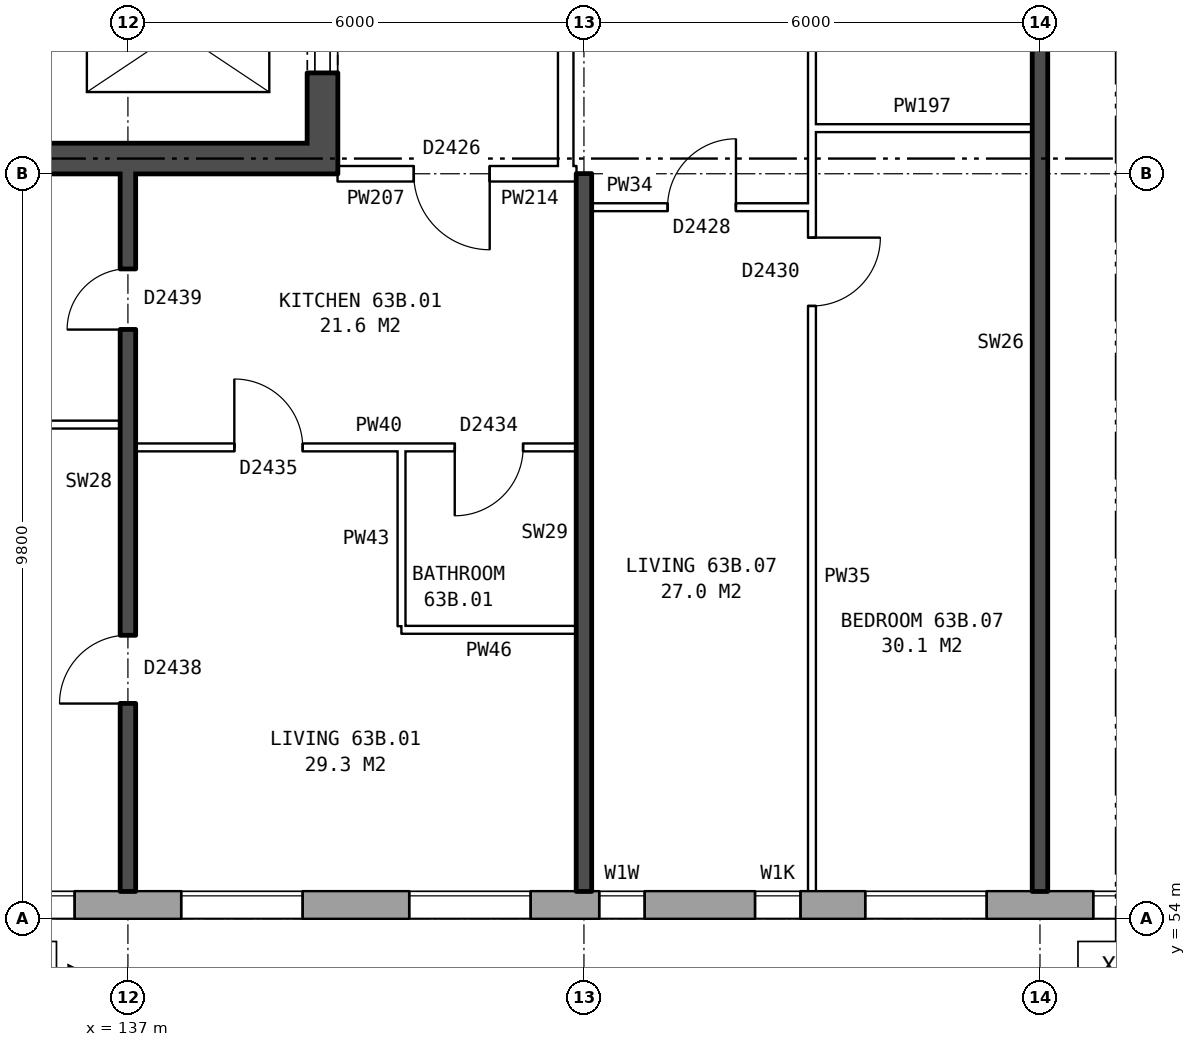
"""IFC4 building model, lengths in metres.
Left out: names, types, materials, properties, quantities, classifications, styles, units other than length and angle.
Written with IfcOpenShell. Run it as: python <this file> out.ifc"""

import sys

from ifc_helpers import new_model, si_unit, direction, frame, frame_2d, origin, place, context, subcontext, project, spatial, rectangle, extrude, element, fill, save


model = new_model("IFC4")
c1 = context("Model", 3, precision=1e-05, world=origin(), true_north=direction((0.0, 1.0)))
c2 = subcontext(c1, "Body", "Model", "MODEL_VIEW")
j1 = project(units=[si_unit("LENGTHUNIT", "METRE"), si_unit("PLANEANGLEUNIT", "RADIAN")], contexts=[c1])
p1 = place(None, origin())
s1 = spatial("IfcSite", under=j1, at=p1, CompositionType="ELEMENT")
p2 = place(p1, origin())
s2 = spatial("IfcBuilding", under=s1, at=p2, CompositionType="ELEMENT")
p3 = place(p2, frame((0.0, 0.0, 224.5)))
s3 = spatial("IfcBuildingStorey", under=s2, at=p3, CompositionType="ELEMENT", Elevation=224.5)
p4 = place(p3, frame((132.05, 54.18, 0.0), z_axis=(0.0, 0.0, 1.0), x_axis=(1.0, 0.0, 0.0)))
e1 = element("IfcWall", 1, at=p4, inside=s3, PredefinedType="STANDARD", context=c2, shape_type="SweptSolid", body=[
    extrude(rectangle(XDim=33.875, YDim=0.36, at=frame_2d((16.938, 0.0))), origin(), (0.0, 0.0, 1.0), 2.85),
])
p5 = place(p4, frame((2.65, 0.0, 0.8)))
e2 = element("IfcOpeningElement", 2, at=p5, cuts=e1, PredefinedType="OPENING", context=c2, shape_type="SweptSolid", body=[
    extrude(rectangle(XDim=1.6, YDim=1.8, at=frame_2d((0.8, 0.9))), frame((0.0, 0.19, 0.0), z_axis=(0.0, -1.0, 0.0), x_axis=(1.0, 0.0, 0.0)), (0.0, 0.0, 1.0), 0.38),
])
p6 = place(p4, frame((5.65, 0.0, 0.8)))
e3 = element("IfcOpeningElement", 3, at=p6, cuts=e1, PredefinedType="OPENING", context=c2, shape_type="SweptSolid", body=[
    extrude(rectangle(XDim=1.6, YDim=1.8, at=frame_2d((0.8, 0.9))), frame((0.0, 0.19, 0.0), z_axis=(0.0, -1.0, 0.0), x_axis=(1.0, 0.0, 0.0)), (0.0, 0.0, 1.0), 0.38),
])
p7 = place(p4, frame((8.65, 0.0, 0.8)))
e4 = element("IfcOpeningElement", 4, at=p7, cuts=e1, PredefinedType="OPENING", context=c2, shape_type="SweptSolid", body=[
    extrude(rectangle(XDim=1.6, YDim=1.8, at=frame_2d((0.8, 0.9))), frame((0.0, 0.19, 0.0), z_axis=(0.0, -1.0, 0.0), x_axis=(1.0, 0.0, 0.0)), (0.0, 0.0, 1.0), 0.38),
])
p8 = place(p4, frame((11.15, 0.0, 1.7)))
e5 = element("IfcOpeningElement", 5, at=p8, cuts=e1, PredefinedType="OPENING", context=c2, shape_type="SweptSolid", body=[
    extrude(rectangle(XDim=0.6, YDim=0.9, at=frame_2d((0.3, 0.45))), frame((0.0, 0.19, 0.0), z_axis=(0.0, -1.0, 0.0), x_axis=(1.0, 0.0, 0.0)), (0.0, 0.0, 1.0), 0.38),
])
p9 = place(p4, frame((14.65, 0.0, 0.8)))
e6 = element("IfcOpeningElement", 6, at=p9, cuts=e1, PredefinedType="OPENING", context=c2, shape_type="SweptSolid", body=[
    extrude(rectangle(XDim=1.6, YDim=1.8, at=frame_2d((0.8, 0.9))), frame((0.0, 0.19, 0.0), z_axis=(0.0, -1.0, 0.0), x_axis=(1.0, 0.0, 0.0)), (0.0, 0.0, 1.0), 0.38),
])
p10 = place(p4, frame((17.65, 0.0, 0.8)))
e7 = element("IfcOpeningElement", 7, at=p10, cuts=e1, PredefinedType="OPENING", context=c2, shape_type="SweptSolid", body=[
    extrude(rectangle(XDim=1.6, YDim=1.8, at=frame_2d((0.8, 0.9))), frame((0.0, 0.19, 0.0), z_axis=(0.0, -1.0, 0.0), x_axis=(1.0, 0.0, 0.0)), (0.0, 0.0, 1.0), 0.38),
])
p11 = place(p4, frame((20.65, 0.0, 0.8)))
e8 = element("IfcOpeningElement", 8, at=p11, cuts=e1, PredefinedType="OPENING", context=c2, shape_type="SweptSolid", body=[
    extrude(rectangle(XDim=1.6, YDim=1.8, at=frame_2d((0.8, 0.9))), frame((0.0, 0.19, 0.0), z_axis=(0.0, -1.0, 0.0), x_axis=(1.0, 0.0, 0.0)), (0.0, 0.0, 1.0), 0.38),
])
p12 = place(p4, frame((24.65, 0.0, 0.8)))
e9 = element("IfcOpeningElement", 9, at=p12, cuts=e1, PredefinedType="OPENING", context=c2, shape_type="SweptSolid", body=[
    extrude(rectangle(XDim=1.6, YDim=1.8, at=frame_2d((0.8, 0.9))), frame((0.0, 0.19, 0.0), z_axis=(0.0, -1.0, 0.0), x_axis=(1.0, 0.0, 0.0)), (0.0, 0.0, 1.0), 0.38),
])
p13 = place(p4, frame((26.65, 0.0, 0.8)))
e10 = element("IfcOpeningElement", 10, at=p13, cuts=e1, PredefinedType="OPENING", context=c2, shape_type="SweptSolid", body=[
    extrude(rectangle(XDim=1.6, YDim=1.8, at=frame_2d((0.8, 0.9))), frame((0.0, 0.19, 0.0), z_axis=(0.0, -1.0, 0.0), x_axis=(1.0, 0.0, 0.0)), (0.0, 0.0, 1.0), 0.38),
])
p14 = place(p4, frame((29.65, 0.0, 0.8)))
e11 = element("IfcOpeningElement", 11, at=p14, cuts=e1, PredefinedType="OPENING", context=c2, shape_type="SweptSolid", body=[
    extrude(rectangle(XDim=1.6, YDim=1.8, at=frame_2d((0.8, 0.9))), frame((0.0, 0.19, 0.0), z_axis=(0.0, -1.0, 0.0), x_axis=(1.0, 0.0, 0.0)), (0.0, 0.0, 1.0), 0.38),
])
p15 = place(p4, frame((13.2, 0.0, 0.8)))
e12 = element("IfcOpeningElement", 12, at=p15, cuts=e1, PredefinedType="OPENING", context=c2, shape_type="SweptSolid", body=[
    extrude(rectangle(XDim=0.6, YDim=1.5, at=frame_2d((0.3, 0.75))), frame((0.0, 0.19, 0.0), z_axis=(0.0, -1.0, 0.0), x_axis=(1.0, 0.0, 0.0)), (0.0, 0.0, 1.0), 0.38),
])
p16 = place(p3, frame((139.56, 63.8, 0.0), z_axis=(0.0, 0.0, 1.0), x_axis=(0.0, 1.0, 0.0)))
e13 = element("IfcWall", 13, at=p16, inside=s3, PredefinedType="SHEAR", context=c2, shape_type="SweptSolid", body=[
    extrude(rectangle(XDim=12.4, YDim=0.4, at=frame_2d((6.2, 0.0))), origin(), (0.0, 0.0, 1.0), 2.85),
])
p17 = place(p16, frame((1.325, 0.0, 0.0)))
e14 = element("IfcOpeningElement", 14, at=p17, cuts=e13, PredefinedType="OPENING", context=c2, shape_type="SweptSolid", body=[
    extrude(rectangle(XDim=1.1, YDim=2.1, at=frame_2d((0.55, 1.05))), frame((0.0, 0.21, 0.0), z_axis=(0.0, -1.0, 0.0), x_axis=(1.0, 0.0, 0.0)), (0.0, 0.0, 1.0), 0.42),
])
p18 = place(p16, frame((3.6, 0.0, 0.0)))
e15 = element("IfcOpeningElement", 15, at=p18, cuts=e13, PredefinedType="OPENING", context=c2, shape_type="SweptSolid", body=[
    extrude(rectangle(XDim=1.1, YDim=2.1, at=frame_2d((0.55, 1.05))), frame((0.0, 0.21, 0.0), z_axis=(0.0, -1.0, 0.0), x_axis=(1.0, 0.0, 0.0)), (0.0, 0.0, 1.0), 0.42),
])
p19 = place(p16, frame((5.8, 0.0, 0.0)))
e16 = element("IfcOpeningElement", 16, at=p19, cuts=e13, PredefinedType="OPENING", context=c2, shape_type="SweptSolid", body=[
    extrude(rectangle(XDim=1.1, YDim=2.1, at=frame_2d((0.55, 1.05))), frame((0.0, 0.21, 0.0), z_axis=(0.0, -1.0, 0.0), x_axis=(1.0, 0.0, 0.0)), (0.0, 0.0, 1.0), 0.42),
])
p20 = place(p16, frame((9.9, 0.0, 0.0)))
e17 = element("IfcOpeningElement", 17, at=p20, cuts=e13, PredefinedType="OPENING", context=c2, shape_type="SweptSolid", body=[
    extrude(rectangle(XDim=1.1, YDim=2.1, at=frame_2d((0.55, 1.05))), frame((0.0, 0.21, 0.0), z_axis=(0.0, -1.0, 0.0), x_axis=(1.0, 0.0, 0.0)), (0.0, 0.0, 1.0), 0.42),
])
p21 = place(p16, frame((8.125, 0.0, 0.0)))
e18 = element("IfcOpeningElement", 18, at=p21, cuts=e13, PredefinedType="OPENING", context=c2, shape_type="SweptSolid", body=[
    extrude(rectangle(XDim=0.85, YDim=2.1, at=frame_2d((0.425, 1.05))), frame((0.0, 0.21, 0.0), z_axis=(0.0, -1.0, 0.0), x_axis=(1.0, 0.0, 0.0)), (0.0, 0.0, 1.0), 0.42),
])
p22 = place(p3, frame((139.36, 64.0, 0.0), z_axis=(0.0, 0.0, 1.0), x_axis=(-1.0, 0.0, 0.0)))
e19 = element("IfcWall", 19, at=p22, inside=s3, PredefinedType="SHEAR", context=c2, shape_type="SweptSolid", body=[
    extrude(rectangle(XDim=7.6, YDim=0.4, at=frame_2d((3.8, 0.0))), origin(), (0.0, 0.0, 1.0), 2.85),
])
p23 = place(p3, frame((142.76, 63.9, 0.0), z_axis=(0.0, 0.0, 1.0), x_axis=(0.0, 1.0, 0.0)))
e20 = element("IfcWall", 20, at=p23, inside=s3, PredefinedType="PARTITIONING", context=c2, shape_type="SweptSolid", body=[
    extrude(rectangle(XDim=12.2, YDim=0.2, at=frame_2d((6.1, 0.0))), origin(), (0.0, 0.0, 1.0), 2.85),
])
p24 = place(p23, frame((5.1, 0.0, 0.0)))
e21 = element("IfcOpeningElement", 21, at=p24, cuts=e20, PredefinedType="OPENING", context=c2, shape_type="SweptSolid", body=[
    extrude(rectangle(XDim=2.0, YDim=2.1, at=frame_2d((1.0, 1.05))), frame((0.0, 0.11, 0.0), z_axis=(0.0, -1.0, 0.0), x_axis=(1.0, 0.0, 0.0)), (0.0, 0.0, 1.0), 0.22),
])
p25 = place(p3, frame((140.6, 57.8, 0.0), z_axis=(0.0, 0.0, 1.0), x_axis=(1.0, 0.0, 0.0)))
e22 = element("IfcWall", 22, at=p25, inside=s3, PredefinedType="PARTITIONING", context=c2, shape_type="SweptSolid", body=[
    extrude(rectangle(XDim=2.3, YDim=0.1, at=frame_2d((1.15, 0.0))), origin(), (0.0, 0.0, 1.0), 2.85),
])
p26 = place(p3, frame((137.1, 60.2, 0.0), z_axis=(0.0, 0.0, 1.0), x_axis=(1.0, 0.0, 0.0)))
e23 = element("IfcWall", 23, at=p26, inside=s3, PredefinedType="PARTITIONING", context=c2, shape_type="SweptSolid", body=[
    extrude(rectangle(XDim=5.8, YDim=0.1, at=frame_2d((2.9, 0.0))), origin(), (0.0, 0.0, 1.0), 2.85),
])
p27 = place(p26, frame((1.3, 0.0, 0.0)))
e24 = element("IfcOpeningElement", 24, at=p27, cuts=e23, PredefinedType="OPENING", context=c2, shape_type="SweptSolid", body=[
    extrude(rectangle(XDim=0.9, YDim=2.1, at=frame_2d((0.45, 1.05))), frame((0.0, 0.06, 0.0), z_axis=(0.0, -1.0, 0.0), x_axis=(1.0, 0.0, 0.0)), (0.0, 0.0, 1.0), 0.12),
])
p28 = place(p26, frame((4.2, 0.0, 0.0)))
e25 = element("IfcOpeningElement", 25, at=p28, cuts=e23, PredefinedType="OPENING", context=c2, shape_type="SweptSolid", body=[
    extrude(rectangle(XDim=0.9, YDim=2.1, at=frame_2d((0.45, 1.05))), frame((0.0, 0.06, 0.0), z_axis=(0.0, -1.0, 0.0), x_axis=(1.0, 0.0, 0.0)), (0.0, 0.0, 1.0), 0.12),
])
p29 = place(p3, frame((131.1, 60.5, 0.0), z_axis=(0.0, 0.0, 1.0), x_axis=(1.0, 0.0, 0.0)))
e26 = element("IfcWall", 26, at=p29, inside=s3, PredefinedType="PARTITIONING", context=c2, shape_type="SweptSolid", body=[
    extrude(rectangle(XDim=5.8, YDim=0.1, at=frame_2d((2.9, 0.0))), origin(), (0.0, 0.0, 1.0), 2.85),
])
p30 = place(p3, frame((143.1, 63.36, 0.0), z_axis=(0.0, 0.0, 1.0), x_axis=(1.0, 0.0, 0.0)))
e27 = element("IfcWall", 27, at=p30, inside=s3, PredefinedType="PARTITIONING", context=c2, shape_type="SweptSolid", body=[
    extrude(rectangle(XDim=2.9, YDim=0.1, at=frame_2d((1.45, 0.0))), origin(), (0.0, 0.0, 1.0), 2.85),
])
p31 = place(p30, frame((1.0, 0.0, 0.0)))
e28 = element("IfcOpeningElement", 28, at=p31, cuts=e27, PredefinedType="OPENING", context=c2, shape_type="SweptSolid", body=[
    extrude(rectangle(XDim=0.9, YDim=2.1, at=frame_2d((0.45, 1.05))), frame((0.0, 0.06, 0.0), z_axis=(0.0, -1.0, 0.0), x_axis=(1.0, 0.0, 0.0)), (0.0, 0.0, 1.0), 0.12),
])
p32 = place(p3, frame((139.76, 63.8, 0.0), z_axis=(0.0, 0.0, 1.0), x_axis=(1.0, 0.0, 0.0)))
e29 = element("IfcWall", 29, at=p32, inside=s3, PredefinedType="PARTITIONING", context=c2, shape_type="SweptSolid", body=[
    extrude(rectangle(XDim=3.0, YDim=0.2, at=frame_2d((1.5, 0.0))), origin(), (0.0, 0.0, 1.0), 2.85),
])
p33 = place(p32, frame((1.0, 0.0, 0.0)))
e30 = element("IfcOpeningElement", 30, at=p33, cuts=e29, PredefinedType="OPENING", context=c2, shape_type="SweptSolid", body=[
    extrude(rectangle(XDim=1.0, YDim=2.1, at=frame_2d((0.5, 1.05))), frame((0.0, 0.11, 0.0), z_axis=(0.0, -1.0, 0.0), x_axis=(1.0, 0.0, 0.0)), (0.0, 0.0, 1.0), 0.22),
])
p34 = place(p3, frame((142.76, 63.8, 0.0), z_axis=(0.0, 0.0, 1.0), x_axis=(1.0, 0.0, 0.0)))
e31 = element("IfcWall", 31, at=p34, inside=s3, PredefinedType="PARTITIONING", context=c2, shape_type="SweptSolid", body=[
    extrude(rectangle(XDim=0.14, YDim=0.2, at=frame_2d((0.07, 0.0))), origin(), (0.0, 0.0, 1.0), 2.85),
])
p35 = place(p3, frame((146.0, 64.4, 0.0), z_axis=(0.0, 0.0, 1.0), x_axis=(1.0, 0.0, 0.0)))
e32 = element("IfcWall", 32, at=p35, inside=s3, PredefinedType="PARTITIONING", context=c2, shape_type="SweptSolid", body=[
    extrude(rectangle(XDim=2.9, YDim=0.1, at=frame_2d((1.45, 0.0))), origin(), (0.0, 0.0, 1.0), 2.85),
])
p36 = place(p3, frame((137.0, 54.36, 0.0), z_axis=(0.0, 0.0, 1.0), x_axis=(0.0, 1.0, 0.0)))
e33 = element("IfcWall", 33, at=p36, inside=s3, PredefinedType="SOLIDWALL", context=c2, shape_type="SweptSolid", body=[
    extrude(rectangle(XDim=9.44, YDim=0.2, at=frame_2d((4.72, 0.0))), origin(), (0.0, 0.0, 1.0), 2.85),
])
p37 = place(p36, frame((2.47, 0.0, 0.0)))
e34 = element("IfcOpeningElement", 34, at=p37, cuts=e33, PredefinedType="OPENING", context=c2, shape_type="SweptSolid", body=[
    extrude(rectangle(XDim=0.9, YDim=2.1, at=frame_2d((0.45, 1.05))), frame((0.0, 0.11, 0.0), z_axis=(0.0, -1.0, 0.0), x_axis=(1.0, 0.0, 0.0)), (0.0, 0.0, 1.0), 0.22),
])
p38 = place(p36, frame((7.39, 0.0, 0.0)))
e35 = element("IfcOpeningElement", 35, at=p38, cuts=e33, PredefinedType="OPENING", context=c2, shape_type="SweptSolid", body=[
    extrude(rectangle(XDim=0.8, YDim=2.1, at=frame_2d((0.4, 1.05))), frame((0.0, 0.11, 0.0), z_axis=(0.0, -1.0, 0.0), x_axis=(1.0, 0.0, 0.0)), (0.0, 0.0, 1.0), 0.22),
])
p39 = place(p3, frame((140.6, 57.85, 0.0), z_axis=(0.0, 0.0, 1.0), x_axis=(0.0, 1.0, 0.0)))
e36 = element("IfcWall", 36, at=p39, inside=s3, PredefinedType="PARTITIONING", context=c2, shape_type="SweptSolid", body=[
    extrude(rectangle(XDim=2.3, YDim=0.1, at=frame_2d((1.15, 0.0))), origin(), (0.0, 0.0, 1.0), 2.85),
])
p40 = place(p3, frame((143.0, 54.36, 0.0), z_axis=(0.0, 0.0, 1.0), x_axis=(0.0, 1.0, 0.0)))
e37 = element("IfcWall", 37, at=p40, inside=s3, PredefinedType="SOLIDWALL", context=c2, shape_type="SweptSolid", body=[
    extrude(rectangle(XDim=9.44, YDim=0.2, at=frame_2d((4.72, 0.0))), origin(), (0.0, 0.0, 1.0), 2.85),
])
p41 = place(p3, frame((146.0, 54.36, 0.0), z_axis=(0.0, 0.0, 1.0), x_axis=(0.0, 1.0, 0.0)))
e38 = element("IfcWall", 38, at=p41, inside=s3, PredefinedType="PARTITIONING", context=c2, shape_type="SweptSolid", body=[
    extrude(rectangle(XDim=14.34, YDim=0.1, at=frame_2d((7.17, 0.0))), origin(), (0.0, 0.0, 1.0), 2.85),
])
p42 = place(p41, frame((7.7, 0.0, 0.0)))
e39 = element("IfcOpeningElement", 39, at=p42, cuts=e38, PredefinedType="OPENING", context=c2, shape_type="SweptSolid", body=[
    extrude(rectangle(XDim=0.9, YDim=2.1, at=frame_2d((0.45, 1.05))), frame((0.0, 0.06, 0.0), z_axis=(0.0, -1.0, 0.0), x_axis=(1.0, 0.0, 0.0)), (0.0, 0.0, 1.0), 0.12),
])
p43 = place(p41, frame((13.04, 0.0, 0.0)))
e40 = element("IfcOpeningElement", 40, at=p43, cuts=e38, PredefinedType="OPENING", context=c2, shape_type="SweptSolid", body=[
    extrude(rectangle(XDim=0.9, YDim=2.1, at=frame_2d((0.45, 1.05))), frame((0.0, 0.06, 0.0), z_axis=(0.0, -1.0, 0.0), x_axis=(1.0, 0.0, 0.0)), (0.0, 0.0, 1.0), 0.12),
])
p44 = place(p3, frame((149.0, 54.36, 0.0), z_axis=(0.0, 0.0, 1.0), x_axis=(0.0, 1.0, 0.0)))
e41 = element("IfcWall", 41, at=p44, inside=s3, PredefinedType="SOLIDWALL", context=c2, shape_type="SweptSolid", body=[
    extrude(rectangle(XDim=14.44, YDim=0.2, at=frame_2d((7.22, 0.0))), origin(), (0.0, 0.0, 1.0), 2.85),
])
p45 = place(p5, origin())
e42 = element("IfcWindow", 42, at=p45, inside=s3, PartitioningType="SINGLE_PANEL", PredefinedType="WINDOW", context=c2, shape_type="SweptSolid", body=[
    extrude(rectangle(XDim=1.6, YDim=1.8, at=frame_2d((0.8, 0.9))), frame((0.0, 0.15, 0.0), z_axis=(0.0, -1.0, 0.0), x_axis=(1.0, 0.0, 0.0)), (0.0, 0.0, 1.0), 0.06),
])
fill(e2, e42)
p46 = place(p6, origin())
e43 = element("IfcWindow", 43, at=p46, inside=s3, PartitioningType="SINGLE_PANEL", PredefinedType="WINDOW", context=c2, shape_type="SweptSolid", body=[
    extrude(rectangle(XDim=1.6, YDim=1.8, at=frame_2d((0.8, 0.9))), frame((0.0, 0.15, 0.0), z_axis=(0.0, -1.0, 0.0), x_axis=(1.0, 0.0, 0.0)), (0.0, 0.0, 1.0), 0.06),
])
fill(e3, e43)
p47 = place(p7, origin())
e44 = element("IfcWindow", 44, at=p47, inside=s3, PartitioningType="SINGLE_PANEL", PredefinedType="WINDOW", context=c2, shape_type="SweptSolid", body=[
    extrude(rectangle(XDim=1.6, YDim=1.8, at=frame_2d((0.8, 0.9))), frame((0.0, 0.15, 0.0), z_axis=(0.0, -1.0, 0.0), x_axis=(1.0, 0.0, 0.0)), (0.0, 0.0, 1.0), 0.06),
])
fill(e4, e44)
p48 = place(p8, origin())
e45 = element("IfcWindow", 45, at=p48, inside=s3, PartitioningType="SINGLE_PANEL", PredefinedType="WINDOW", context=c2, shape_type="SweptSolid", body=[
    extrude(rectangle(XDim=0.6, YDim=0.9, at=frame_2d((0.3, 0.45))), frame((0.0, 0.15, 0.0), z_axis=(0.0, -1.0, 0.0), x_axis=(1.0, 0.0, 0.0)), (0.0, 0.0, 1.0), 0.06),
])
fill(e5, e45)
p49 = place(p9, origin())
e46 = element("IfcWindow", 46, at=p49, inside=s3, PartitioningType="SINGLE_PANEL", PredefinedType="WINDOW", context=c2, shape_type="SweptSolid", body=[
    extrude(rectangle(XDim=1.6, YDim=1.8, at=frame_2d((0.8, 0.9))), frame((0.0, 0.15, 0.0), z_axis=(0.0, -1.0, 0.0), x_axis=(1.0, 0.0, 0.0)), (0.0, 0.0, 1.0), 0.06),
])
fill(e6, e46)
p50 = place(p10, origin())
e47 = element("IfcWindow", 47, at=p50, inside=s3, PartitioningType="SINGLE_PANEL", PredefinedType="WINDOW", context=c2, shape_type="SweptSolid", body=[
    extrude(rectangle(XDim=1.6, YDim=1.8, at=frame_2d((0.8, 0.9))), frame((0.0, 0.15, 0.0), z_axis=(0.0, -1.0, 0.0), x_axis=(1.0, 0.0, 0.0)), (0.0, 0.0, 1.0), 0.06),
])
fill(e7, e47)
p51 = place(p17, origin())
e48 = element("IfcDoor", 48, at=p51, inside=s3, OperationType="DOUBLE_DOOR_SLIDING", PredefinedType="DOOR", context=c2, shape_type="SweptSolid", body=[
    extrude(rectangle(XDim=1.1, YDim=2.1, at=frame_2d((0.55, 1.05))), frame((0.0, 0.185, 0.0), z_axis=(0.0, -1.0, 0.0), x_axis=(1.0, 0.0, 0.0)), (0.0, 0.0, 1.0), 0.05),
])
fill(e14, e48)
p52 = place(p37, origin())
e49 = element("IfcDoor", 49, at=p52, inside=s3, OperationType="SINGLE_SWING_LEFT", PredefinedType="DOOR", context=c2, shape_type="SweptSolid", body=[
    extrude(rectangle(XDim=0.9, YDim=2.1, at=frame_2d((0.45, 1.05))), frame((0.0, 0.025, 0.0), z_axis=(0.0, -1.0, 0.0), x_axis=(1.0, 0.0, 0.0)), (0.0, 0.0, 1.0), 0.05),
])
fill(e34, e49)
p53 = place(p33, frame((1.0, 0.0, 0.0), z_axis=(0.0, 0.0, 1.0), x_axis=(-1.0, 0.0, 0.0)))
e50 = element("IfcDoor", 50, at=p53, inside=s3, OperationType="SINGLE_SWING_LEFT", PredefinedType="DOOR", context=c2, shape_type="SweptSolid", body=[
    extrude(rectangle(XDim=1.0, YDim=2.1, at=frame_2d((0.5, 1.05))), frame((0.0, 0.025, 0.0), z_axis=(0.0, -1.0, 0.0), x_axis=(1.0, 0.0, 0.0)), (0.0, 0.0, 1.0), 0.05),
])
fill(e30, e50)
p54 = place(p27, origin())
e51 = element("IfcDoor", 51, at=p54, inside=s3, OperationType="SINGLE_SWING_LEFT", PredefinedType="DOOR", context=c2, shape_type="SweptSolid", body=[
    extrude(rectangle(XDim=0.9, YDim=2.1, at=frame_2d((0.45, 1.05))), frame((0.0, 0.025, 0.0), z_axis=(0.0, -1.0, 0.0), x_axis=(1.0, 0.0, 0.0)), (0.0, 0.0, 1.0), 0.05),
])
fill(e24, e51)
p55 = place(p38, origin())
e52 = element("IfcDoor", 52, at=p55, inside=s3, OperationType="SINGLE_SWING_LEFT", PredefinedType="DOOR", context=c2, shape_type="SweptSolid", body=[
    extrude(rectangle(XDim=0.8, YDim=2.1, at=frame_2d((0.4, 1.05))), frame((0.0, 0.025, 0.0), z_axis=(0.0, -1.0, 0.0), x_axis=(1.0, 0.0, 0.0)), (0.0, 0.0, 1.0), 0.05),
])
fill(e35, e52)
p56 = place(p28, frame((0.9, 0.0, 0.0), z_axis=(0.0, 0.0, 1.0), x_axis=(-1.0, 0.0, 0.0)))
e53 = element("IfcDoor", 53, at=p56, inside=s3, OperationType="SINGLE_SWING_RIGHT", PredefinedType="DOOR", context=c2, shape_type="SweptSolid", body=[
    extrude(rectangle(XDim=0.9, YDim=2.1, at=frame_2d((0.45, 1.05))), frame((0.0, 0.025, 0.0), z_axis=(0.0, -1.0, 0.0), x_axis=(1.0, 0.0, 0.0)), (0.0, 0.0, 1.0), 0.05),
])
fill(e25, e53)
p57 = place(p42, frame((0.9, 0.0, 0.0), z_axis=(0.0, 0.0, 1.0), x_axis=(-1.0, 0.0, 0.0)))
e54 = element("IfcDoor", 54, at=p57, inside=s3, OperationType="SINGLE_SWING_LEFT", PredefinedType="DOOR", context=c2, shape_type="SweptSolid", body=[
    extrude(rectangle(XDim=0.9, YDim=2.1, at=frame_2d((0.45, 1.05))), frame((0.0, 0.025, 0.0), z_axis=(0.0, -1.0, 0.0), x_axis=(1.0, 0.0, 0.0)), (0.0, 0.0, 1.0), 0.05),
])
fill(e39, e54)
p58 = place(p31, origin())
e55 = element("IfcDoor", 55, at=p58, inside=s3, OperationType="SINGLE_SWING_RIGHT", PredefinedType="DOOR", context=c2, shape_type="SweptSolid", body=[
    extrude(rectangle(XDim=0.9, YDim=2.1, at=frame_2d((0.45, 1.05))), frame((0.0, 0.025, 0.0), z_axis=(0.0, -1.0, 0.0), x_axis=(1.0, 0.0, 0.0)), (0.0, 0.0, 1.0), 0.05),
])
fill(e28, e55)
p59 = place(p15, origin())
e56 = element("IfcWindow", 56, at=p59, inside=s3, PartitioningType="SINGLE_PANEL", PredefinedType="WINDOW", context=c2, shape_type="SweptSolid", body=[
    extrude(rectangle(XDim=0.6, YDim=1.5, at=frame_2d((0.3, 0.75))), frame((0.0, 0.15, 0.0), z_axis=(0.0, -1.0, 0.0), x_axis=(1.0, 0.0, 0.0)), (0.0, 0.0, 1.0), 0.06),
])
fill(e12, e56)
save(model, sys.argv[1])
